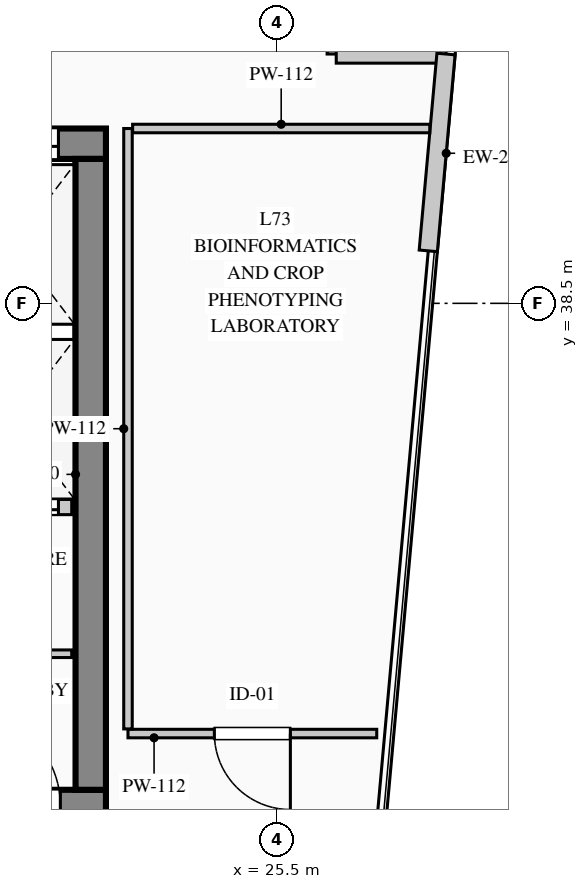
"""IFC4 building model, lengths in metres.
Left out: names, types, materials, properties, quantities, classifications, styles, units other than length and angle.
Written with IfcOpenShell. Run it as: python <this file> out.ifc"""

import sys

from ifc_helpers import new_model, si_unit, direction, frame, frame_2d, origin, place, context, subcontext, project, spatial, rectangle, extrude, element, fill, save


model = new_model("IFC4")
c1 = context("Model", 3, precision=1e-05, world=origin(), true_north=direction((0.0, 1.0)))
c2 = subcontext(c1, "Body", "Model", "MODEL_VIEW")
j1 = project(units=[si_unit("LENGTHUNIT", "METRE"), si_unit("PLANEANGLEUNIT", "RADIAN")], contexts=[c1])
p1 = place(None, origin())
s1 = spatial("IfcSite", under=j1, at=p1, CompositionType="ELEMENT")
p2 = place(p1, origin())
s2 = spatial("IfcBuilding", under=s1, at=p2, CompositionType="ELEMENT")
p3 = place(p2, frame((0.0, 0.0, 304.1)))
s3 = spatial("IfcBuildingStorey", under=s2, at=p3, CompositionType="ELEMENT", Elevation=304.1)
p4 = place(p3, frame((5.6, 40.6, 0.0), z_axis=(0.0, 0.0, 1.0), x_axis=(1.0, 0.0, 0.0)))
e1 = element("IfcWall", 1, at=p4, inside=s3, PredefinedType="SHEAR", context=c2, shape_type="SweptSolid", body=[
    extrude(rectangle(XDim=17.65, YDim=0.4, at=frame_2d((8.825, 0.0))), origin(), (0.0, 0.0, 1.0), 3.95),
])
p5 = place(p4, frame((15.845, 0.0, 0.0)))
e2 = element("IfcOpeningElement", 2, at=p5, cuts=e1, PredefinedType="OPENING", context=c2, shape_type="SweptSolid", body=[
    extrude(rectangle(XDim=1.18, YDim=2.25, at=frame_2d((0.59, 1.125))), frame((0.0, 0.21, 0.0), z_axis=(0.0, -1.0, 0.0), x_axis=(1.0, 0.0, 0.0)), (0.0, 0.0, 1.0), 0.42),
])
p6 = place(p3, frame((5.6, 31.9, 0.0), z_axis=(0.0, 0.0, 1.0), x_axis=(1.0, 0.0, 0.0)))
e3 = element("IfcWall", 3, at=p6, inside=s3, PredefinedType="SHEAR", context=c2, shape_type="SweptSolid", body=[
    extrude(rectangle(XDim=17.65, YDim=0.4, at=frame_2d((8.825, 0.0))), origin(), (0.0, 0.0, 1.0), 3.95),
])
p7 = place(p6, frame((3.05, 0.0, 0.0)))
e4 = element("IfcOpeningElement", 4, at=p7, cuts=e3, PredefinedType="OPENING", context=c2, shape_type="SweptSolid", body=[
    extrude(rectangle(XDim=1.2, YDim=2.2, at=frame_2d((0.6, 1.1))), frame((0.0, 0.21, 0.0), z_axis=(0.0, -1.0, 0.0), x_axis=(1.0, 0.0, 0.0)), (0.0, 0.0, 1.0), 0.42),
])
p8 = place(p6, frame((6.9, 0.0, 0.0)))
e5 = element("IfcOpeningElement", 5, at=p8, cuts=e3, PredefinedType="OPENING", context=c2, shape_type="SweptSolid", body=[
    extrude(rectangle(XDim=1.2, YDim=2.2, at=frame_2d((0.6, 1.1))), frame((0.0, 0.21, 0.0), z_axis=(0.0, -1.0, 0.0), x_axis=(1.0, 0.0, 0.0)), (0.0, 0.0, 1.0), 0.42),
])
p9 = place(p6, frame((8.75, 0.0, 0.0)))
e6 = element("IfcOpeningElement", 6, at=p9, cuts=e3, PredefinedType="OPENING", context=c2, shape_type="SweptSolid", body=[
    extrude(rectangle(XDim=1.15, YDim=2.2, at=frame_2d((0.575, 1.1))), frame((0.0, 0.21, 0.0), z_axis=(0.0, -1.0, 0.0), x_axis=(1.0, 0.0, 0.0)), (0.0, 0.0, 1.0), 0.42),
])
p10 = place(p6, frame((15.85, 0.0, 0.0)))
e7 = element("IfcOpeningElement", 7, at=p10, cuts=e3, PredefinedType="OPENING", context=c2, shape_type="SweptSolid", body=[
    extrude(rectangle(XDim=1.2, YDim=2.2, at=frame_2d((0.6, 1.1))), frame((0.0, 0.21, 0.0), z_axis=(0.0, -1.0, 0.0), x_axis=(1.0, 0.0, 0.0)), (0.0, 0.0, 1.0), 0.42),
])
p11 = place(p3, frame((23.05, 32.1, 0.0), z_axis=(0.0, 0.0, 1.0), x_axis=(0.0, 1.0, 0.0)))
e8 = element("IfcWall", 8, at=p11, inside=s3, PredefinedType="SHEAR", context=c2, shape_type="SweptSolid", body=[
    extrude(rectangle(XDim=8.3, YDim=0.4, at=frame_2d((4.15, 0.0))), origin(), (0.0, 0.0, 1.0), 3.95),
])
p12 = place(p3, frame((26.28, 43.38, 0.0), z_axis=(0.0, 0.0, 1.0), x_axis=(0.0, -1.0, 0.0)))
e9 = element("IfcWall", 9, at=p12, inside=s3, PredefinedType="STANDARD", context=c2, shape_type="SweptSolid", body=[
    extrude(rectangle(XDim=1.6, YDim=0.24, at=frame_2d((0.8, 0.0))), origin(), (0.0, 0.0, 1.0), 3.7),
])
p13 = place(p3, frame((26.28, 41.78, 0.0), z_axis=(0.0, 0.0, 1.0), x_axis=(1.0, 0.0, 0.0)))
e10 = element("IfcWall", 10, at=p13, inside=s3, PredefinedType="STANDARD", context=c2, shape_type="SweptSolid", body=[
    extrude(rectangle(XDim=1.444, YDim=0.24, at=frame_2d((0.722, 0.0))), origin(), (0.0, 0.0, 1.0), 3.7),
])
p14 = place(p3, frame((27.724, 41.78, 0.0), z_axis=(0.0, 0.0, 1.0), x_axis=(-0.089765303723, -0.995962946222, 0.0)))
e11 = element("IfcWall", 11, at=p14, inside=s3, PredefinedType="STANDARD", context=c2, shape_type="SweptSolid", body=[
    extrude(rectangle(XDim=2.6, YDim=0.24, at=frame_2d((1.3, 0.0))), origin(), (0.0, 0.0, 1.0), 3.7),
])
p15 = place(p3, frame((21.38, 33.89, 0.0), z_axis=(0.0, 0.0, 1.0), x_axis=(1.0, 0.0, 0.0)))
e12 = element("IfcWall", 12, at=p15, inside=s3, PredefinedType="PARTITIONING", context=c2, shape_type="SweptSolid", body=[
    extrude(rectangle(XDim=1.42, YDim=0.1, at=frame_2d((0.71, 0.0))), origin(), (0.0, 0.0, 1.0), 3.7),
])
p16 = place(p15, frame((0.28, 0.0, 0.0)))
e13 = element("IfcOpeningElement", 13, at=p16, cuts=e12, PredefinedType="OPENING", context=c2, shape_type="SweptSolid", body=[
    extrude(rectangle(XDim=0.85, YDim=2.1, at=frame_2d((0.425, 1.05))), frame((0.0, 0.06, 0.0), z_axis=(0.0, -1.0, 0.0), x_axis=(1.0, 0.0, 0.0)), (0.0, 0.0, 1.0), 0.12),
])
p17 = place(p3, frame((21.3, 35.82, 0.0), z_axis=(0.0, 0.0, 1.0), x_axis=(1.0, 0.0, 0.0)))
e14 = element("IfcWall", 14, at=p17, inside=s3, PredefinedType="PARTITIONING", context=c2, shape_type="SweptSolid", body=[
    extrude(rectangle(XDim=1.5, YDim=0.2, at=frame_2d((0.75, 0.0))), origin(), (0.0, 0.0, 1.0), 3.7),
])
p18 = place(p17, frame((0.145, 0.0, 0.0)))
e15 = element("IfcOpeningElement", 15, at=p18, cuts=e14, PredefinedType="OPENING", context=c2, shape_type="SweptSolid", body=[
    extrude(rectangle(XDim=1.18, YDim=2.25, at=frame_2d((0.59, 1.125))), frame((0.0, 0.11, 0.0), z_axis=(0.0, -1.0, 0.0), x_axis=(1.0, 0.0, 0.0)), (0.0, 0.0, 1.0), 0.22),
])
p19 = place(p3, frame((26.813, 32.84, 0.0), z_axis=(0.0, 0.0, 1.0), x_axis=(-1.0, 0.0, 0.0)))
e16 = element("IfcWall", 16, at=p19, inside=s3, PredefinedType="PARTITIONING", context=c2, shape_type="SweptSolid", body=[
    extrude(rectangle(XDim=3.273, YDim=0.112, at=frame_2d((1.636, 0.0))), origin(), (0.0, 0.0, 1.0), 3.7),
])
p20 = place(p19, frame((1.136, 0.0, 0.0)))
e17 = element("IfcOpeningElement", 17, at=p20, cuts=e16, PredefinedType="OPENING", context=c2, shape_type="SweptSolid", body=[
    extrude(rectangle(XDim=1.0, YDim=2.15, at=frame_2d((0.5, 1.075))), frame((0.0, 0.066, 0.0), z_axis=(0.0, -1.0, 0.0), x_axis=(1.0, 0.0, 0.0)), (0.0, 0.0, 1.0), 0.132),
])
p21 = place(p3, frame((23.54, 32.901, 0.0), z_axis=(0.0, 0.0, 1.0), x_axis=(0.0, 1.0, 0.0)))
e18 = element("IfcWall", 18, at=p21, inside=s3, PredefinedType="PARTITIONING", context=c2, shape_type="SweptSolid", body=[
    extrude(rectangle(XDim=7.899, YDim=0.112, at=frame_2d((3.95, 0.0))), origin(), (0.0, 0.0, 1.0), 3.7),
])
p22 = place(p3, frame((23.601, 40.8, 0.0), z_axis=(0.0, 0.0, 1.0), x_axis=(1.0, 0.0, 0.0)))
e19 = element("IfcWall", 19, at=p22, inside=s3, PredefinedType="PARTITIONING", context=c2, shape_type="SweptSolid", body=[
    extrude(rectangle(XDim=3.909, YDim=0.112, at=frame_2d((1.955, 0.0))), origin(), (0.0, 0.0, 1.0), 3.7),
])
p23 = place(p10, origin())
e20 = element("IfcDoor", 20, at=p23, inside=s3, OperationType="SINGLE_SWING_LEFT", PredefinedType="DOOR", context=c2, shape_type="SweptSolid", body=[
    extrude(rectangle(XDim=1.2, YDim=2.2, at=frame_2d((0.6, 1.1))), frame((0.0, 0.025, 0.0), z_axis=(0.0, -1.0, 0.0), x_axis=(1.0, 0.0, 0.0)), (0.0, 0.0, 1.0), 0.05),
])
fill(e7, e20)
p24 = place(p5, origin())
e21 = element("IfcDoor", 21, at=p24, inside=s3, OperationType="DOUBLE_DOOR_SLIDING", PredefinedType="DOOR", context=c2, shape_type="SweptSolid", body=[
    extrude(rectangle(XDim=1.18, YDim=2.25, at=frame_2d((0.59, 1.125))), frame((0.0, 0.025, 0.0), z_axis=(0.0, -1.0, 0.0), x_axis=(1.0, 0.0, 0.0)), (0.0, 0.0, 1.0), 0.05),
])
fill(e2, e21)
p25 = place(p18, origin())
e22 = element("IfcDoor", 22, at=p25, inside=s3, OperationType="DOUBLE_DOOR_SLIDING", PredefinedType="DOOR", context=c2, shape_type="SweptSolid", body=[
    extrude(rectangle(XDim=1.18, YDim=2.25, at=frame_2d((0.59, 1.125))), frame((0.0, 0.025, 0.0), z_axis=(0.0, -1.0, 0.0), x_axis=(1.0, 0.0, 0.0)), (0.0, 0.0, 1.0), 0.05),
])
fill(e15, e22)
p26 = place(p20, origin())
e23 = element("IfcDoor", 23, at=p26, inside=s3, OperationType="SINGLE_SWING_LEFT", PredefinedType="DOOR", context=c2, shape_type="SweptSolid", body=[
    extrude(rectangle(XDim=1.0, YDim=2.15, at=frame_2d((0.5, 1.075))), frame((0.0, 0.025, 0.0), z_axis=(0.0, -1.0, 0.0), x_axis=(1.0, 0.0, 0.0)), (0.0, 0.0, 1.0), 0.05),
])
fill(e17, e23)
save(model, sys.argv[1])
